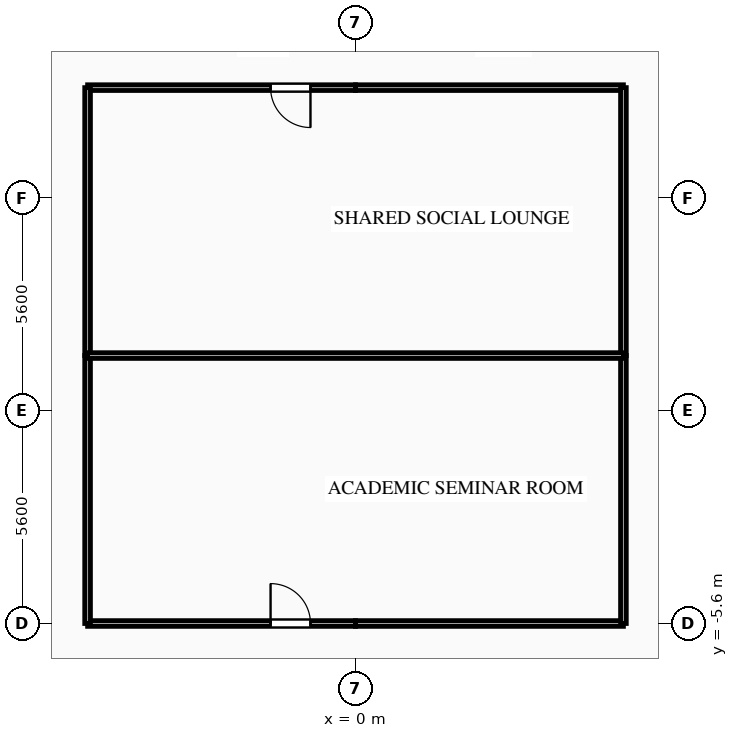
"""IFC4 building model, lengths in metres.
Left out: names, types, materials, properties, quantities, classifications, styles, units other than length and angle.
Written with IfcOpenShell. Run it as: python <this file> out.ifc"""

import sys

from ifc_helpers import new_model, si_unit, direction, frame, frame_2d, origin, place, context, subcontext, project, spatial, rectangle, extrude, element, fill, save


model = new_model("IFC4")
c1 = context("Model", 3, precision=1e-05, world=origin(), true_north=direction((0.0, 1.0)))
c2 = subcontext(c1, "Body", "Model", "MODEL_VIEW")
j1 = project(units=[si_unit("LENGTHUNIT", "METRE"), si_unit("PLANEANGLEUNIT", "RADIAN")], contexts=[c1])
p1 = place(None, origin())
s1 = spatial("IfcSite", under=j1, at=p1, CompositionType="ELEMENT")
p2 = place(p1, origin())
s2 = spatial("IfcBuilding", under=s1, at=p2, CompositionType="ELEMENT")
p3 = place(p2, frame((0.0, 0.0, 92.4)))
s3 = spatial("IfcBuildingStorey", under=s2, at=p3, CompositionType="ELEMENT", Elevation=92.4)
p4 = place(p3, frame((0.0, 8.5, 0.0), z_axis=(0.0, 0.0, 1.0), x_axis=(-1.0, 0.0, 0.0)))
e1 = element("IfcWall", 1, at=p4, inside=s3, PredefinedType="PARTITIONING", context=c2, shape_type="SweptSolid", body=[
    extrude(rectangle(XDim=7.05, YDim=0.15, at=frame_2d((3.525, 0.0))), origin(), (0.0, 0.0, 1.0), 3.045),
])
p5 = place(p4, frame((1.185, 0.0, 0.0)))
e2 = element("IfcOpeningElement", 2, at=p5, cuts=e1, PredefinedType="OPENING", context=c2, shape_type="SweptSolid", body=[
    extrude(rectangle(XDim=1.05, YDim=2.15, at=frame_2d((0.525, 1.075))), frame((0.0, 0.085, 0.0), z_axis=(0.0, -1.0, 0.0), x_axis=(1.0, 0.0, 0.0)), (0.0, 0.0, 1.0), 0.17),
])
p6 = place(p3, frame((7.05, 8.5, 0.0), z_axis=(0.0, 0.0, 1.0), x_axis=(-1.0, 0.0, 0.0)))
e3 = element("IfcWall", 3, at=p6, inside=s3, PredefinedType="PARTITIONING", context=c2, shape_type="SweptSolid", body=[
    extrude(rectangle(XDim=7.05, YDim=0.15, at=frame_2d((3.525, 0.0))), origin(), (0.0, 0.0, 1.0), 3.045),
])
p7 = place(p3, frame((-7.05, -5.6, 0.0), z_axis=(0.0, 0.0, 1.0), x_axis=(1.0, 0.0, 0.0)))
e4 = element("IfcWall", 4, at=p7, inside=s3, PredefinedType="PARTITIONING", context=c2, shape_type="SweptSolid", body=[
    extrude(rectangle(XDim=7.05, YDim=0.15, at=frame_2d((3.525, 0.0))), origin(), (0.0, 0.0, 1.0), 2.53),
])
p8 = place(p7, frame((4.815, 0.0, 0.0)))
e5 = element("IfcOpeningElement", 5, at=p8, cuts=e4, PredefinedType="OPENING", context=c2, shape_type="SweptSolid", body=[
    extrude(rectangle(XDim=1.05, YDim=2.15, at=frame_2d((0.525, 1.075))), frame((0.0, 0.085, 0.0), z_axis=(0.0, -1.0, 0.0), x_axis=(1.0, 0.0, 0.0)), (0.0, 0.0, 1.0), 0.17),
])
p9 = place(p3, frame((0.0, -5.6, 0.0), z_axis=(0.0, 0.0, 1.0), x_axis=(1.0, 0.0, 0.0)))
e6 = element("IfcWall", 6, at=p9, inside=s3, PredefinedType="PARTITIONING", context=c2, shape_type="SweptSolid", body=[
    extrude(rectangle(XDim=7.05, YDim=0.15, at=frame_2d((3.525, 0.0))), origin(), (0.0, 0.0, 1.0), 2.53),
])
for number, where, z_axis, x_axis in (
    (7, (-7.05, 1.45, 0.0), (0.0, 0.0, 1.0), (0.0, -1.0, 0.0)),
    (8, (-7.05, 8.5, 0.0), (0.0, 0.0, 1.0), (0.0, -1.0, 0.0)),
    (9, (7.05, -5.6, 0.0), (0.0, 0.0, 1.0), (0.0, 1.0, 0.0)),
    (10, (7.05, 1.45, 0.0), (0.0, 0.0, 1.0), (0.0, 1.0, 0.0)),
):
    element("IfcWall", number, at=place(p3, frame(where, z_axis=z_axis, x_axis=x_axis)), inside=s3, PredefinedType="PARTITIONING", context=c2, shape_type="SweptSolid", body=[
        extrude(rectangle(XDim=7.05, YDim=0.15, at=frame_2d((3.525, 0.0))), origin(), (0.0, 0.0, 1.0), 3.045),
    ])
p10 = place(p3, frame((-7.05, 1.45, 0.0), z_axis=(0.0, 0.0, 1.0), x_axis=(1.0, 0.0, 0.0)))
e11 = element("IfcWall", 11, at=p10, inside=s3, PredefinedType="PARTITIONING", context=c2, shape_type="SweptSolid", body=[
    extrude(rectangle(XDim=14.1, YDim=0.15, at=frame_2d((7.05, 0.0))), origin(), (0.0, 0.0, 1.0), 3.045),
])
p11 = place(p5, origin())
e12 = element("IfcDoor", 12, at=p11, inside=s3, OperationType="SINGLE_SWING_LEFT", PredefinedType="DOOR", context=c2, shape_type="SweptSolid", body=[
    extrude(rectangle(XDim=1.05, YDim=2.15, at=frame_2d((0.525, 1.075))), frame((0.0, 0.025, 0.0), z_axis=(0.0, -1.0, 0.0), x_axis=(1.0, 0.0, 0.0)), (0.0, 0.0, 1.0), 0.05),
])
fill(e2, e12)
p12 = place(p8, origin())
e13 = element("IfcDoor", 13, at=p12, inside=s3, OperationType="SINGLE_SWING_LEFT", PredefinedType="DOOR", context=c2, shape_type="SweptSolid", body=[
    extrude(rectangle(XDim=1.05, YDim=2.15, at=frame_2d((0.525, 1.075))), frame((0.0, 0.025, 0.0), z_axis=(0.0, -1.0, 0.0), x_axis=(1.0, 0.0, 0.0)), (0.0, 0.0, 1.0), 0.05),
])
fill(e5, e13)
save(model, sys.argv[1])
